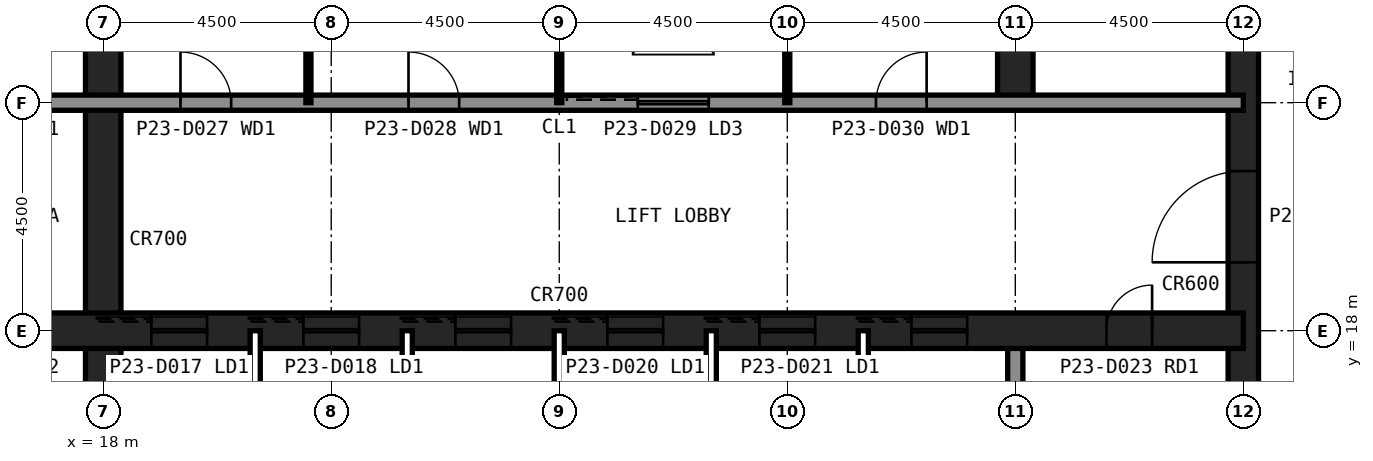
"""IFC4 building model, lengths in metres.
Left out: names, types, materials, properties, quantities, classifications, styles, units other than length and angle.
Written with IfcOpenShell. Run it as: python <this file> out.ifc"""

import sys

from ifc_helpers import new_model, si_unit, direction, frame, frame_2d, origin, place, context, subcontext, project, spatial, rectangle, extrude, element, fill, save


model = new_model("IFC4")
c1 = context("Model", 3, precision=1e-05, world=origin(), true_north=direction((0.0, 1.0)))
c2 = subcontext(c1, "Body", "Model", "MODEL_VIEW")
j1 = project(units=[si_unit("LENGTHUNIT", "METRE"), si_unit("PLANEANGLEUNIT", "RADIAN")], contexts=[c1])
p1 = place(None, origin())
s1 = spatial("IfcSite", under=j1, at=p1, CompositionType="ELEMENT")
p2 = place(p1, origin())
s2 = spatial("IfcBuilding", under=s1, at=p2, CompositionType="ELEMENT")
p3 = place(p2, frame((0.0, 0.0, 96.2)))
s3 = spatial("IfcBuildingStorey", under=s2, at=p3, CompositionType="ELEMENT", Elevation=96.2)
p4 = place(p3, frame((40.5, 13.5, 0.0), z_axis=(0.0, 0.0, 1.0), x_axis=(0.0, 1.0, 0.0)))
e1 = element("IfcWall", 1, at=p4, inside=s3, PredefinedType="SHEAR", context=c2, shape_type="SweptSolid", body=[
    extrude(rectangle(XDim=27.0, YDim=0.6, at=frame_2d((13.5, 0.0))), origin(), (0.0, 0.0, 1.0), 4.2),
])
p5 = place(p4, frame((5.85, 0.0, 0.0)))
e2 = element("IfcOpeningElement", 2, at=p5, cuts=e1, PredefinedType="OPENING", context=c2, shape_type="SweptSolid", body=[
    extrude(rectangle(XDim=1.8, YDim=2.1, at=frame_2d((0.9, 1.05))), frame((0.0, 0.31, 0.0), z_axis=(0.0, -1.0, 0.0), x_axis=(1.0, 0.0, 0.0)), (0.0, 0.0, 1.0), 0.62),
])
p6 = place(p4, frame((19.65, 0.0, 0.0)))
e3 = element("IfcOpeningElement", 3, at=p6, cuts=e1, PredefinedType="OPENING", context=c2, shape_type="SweptSolid", body=[
    extrude(rectangle(XDim=1.2, YDim=2.1, at=frame_2d((0.6, 1.05))), frame((0.0, 0.31, 0.0), z_axis=(0.0, -1.0, 0.0), x_axis=(1.0, 0.0, 0.0)), (0.0, 0.0, 1.0), 0.62),
])
p7 = place(p3, frame((18.0, 13.5, 0.0), z_axis=(0.0, 0.0, 1.0), x_axis=(0.0, 1.0, 0.0)))
e4 = element("IfcWall", 4, at=p7, inside=s3, PredefinedType="SHEAR", context=c2, shape_type="SweptSolid", body=[
    extrude(rectangle(XDim=18.0, YDim=0.7, at=frame_2d((9.0, 0.0))), origin(), (0.0, 0.0, 1.0), 4.2),
])
p8 = place(p3, frame((36.0, 13.5, 0.0), z_axis=(0.0, 0.0, 1.0), x_axis=(0.0, 1.0, 0.0)))
e5 = element("IfcWall", 5, at=p8, inside=s3, PredefinedType="SOLIDWALL", context=c2, shape_type="SweptSolid", body=[
    extrude(rectangle(XDim=4.5, YDim=0.3, at=frame_2d((2.25, 0.0))), origin(), (0.0, 0.0, 1.0), 4.04),
])
p9 = place(p3, frame((36.0, 22.5, 0.0), z_axis=(0.0, 0.0, 1.0), x_axis=(0.0, 1.0, 0.0)))
e6 = element("IfcWall", 6, at=p9, inside=s3, PredefinedType="SHEAR", context=c2, shape_type="SweptSolid", body=[
    extrude(rectangle(XDim=18.0, YDim=0.7, at=frame_2d((9.0, 0.0))), origin(), (0.0, 0.0, 1.0), 4.2),
])
p10 = place(p3, frame((13.5, 18.0, 0.0), z_axis=(0.0, 0.0, 1.0), x_axis=(1.0, 0.0, 0.0)))
e7 = element("IfcWall", 7, at=p10, inside=s3, PredefinedType="SHEAR", context=c2, shape_type="SweptSolid", body=[
    extrude(rectangle(XDim=27.0, YDim=0.7, at=frame_2d((13.5, 0.0))), origin(), (0.0, 0.0, 1.0), 4.2),
])
p11 = place(p10, frame((24.3, 0.0, 0.0)))
e8 = element("IfcOpeningElement", 8, at=p11, cuts=e7, PredefinedType="OPENING", context=c2, shape_type="SweptSolid", body=[
    extrude(rectangle(XDim=0.9, YDim=2.1, at=frame_2d((0.45, 1.05))), frame((0.0, 0.36, 0.0), z_axis=(0.0, -1.0, 0.0), x_axis=(1.0, 0.0, 0.0)), (0.0, 0.0, 1.0), 0.72),
])
p12 = place(p10, frame((5.45, 0.0, 0.0)))
e9 = element("IfcOpeningElement", 9, at=p12, cuts=e7, PredefinedType="OPENING", context=c2, shape_type="SweptSolid", body=[
    extrude(rectangle(XDim=1.1, YDim=2.1, at=frame_2d((0.55, 1.05))), frame((0.0, 0.36, 0.0), z_axis=(0.0, -1.0, 0.0), x_axis=(1.0, 0.0, 0.0)), (0.0, 0.0, 1.0), 0.72),
])
p13 = place(p10, frame((8.45, 0.0, 0.0)))
e10 = element("IfcOpeningElement", 10, at=p13, cuts=e7, PredefinedType="OPENING", context=c2, shape_type="SweptSolid", body=[
    extrude(rectangle(XDim=1.1, YDim=2.1, at=frame_2d((0.55, 1.05))), frame((0.0, 0.36, 0.0), z_axis=(0.0, -1.0, 0.0), x_axis=(1.0, 0.0, 0.0)), (0.0, 0.0, 1.0), 0.72),
])
p14 = place(p10, frame((11.45, 0.0, 0.0)))
e11 = element("IfcOpeningElement", 11, at=p14, cuts=e7, PredefinedType="OPENING", context=c2, shape_type="SweptSolid", body=[
    extrude(rectangle(XDim=1.1, YDim=2.1, at=frame_2d((0.55, 1.05))), frame((0.0, 0.36, 0.0), z_axis=(0.0, -1.0, 0.0), x_axis=(1.0, 0.0, 0.0)), (0.0, 0.0, 1.0), 0.72),
])
p15 = place(p10, frame((14.45, 0.0, 0.0)))
e12 = element("IfcOpeningElement", 12, at=p15, cuts=e7, PredefinedType="OPENING", context=c2, shape_type="SweptSolid", body=[
    extrude(rectangle(XDim=1.1, YDim=2.1, at=frame_2d((0.55, 1.05))), frame((0.0, 0.36, 0.0), z_axis=(0.0, -1.0, 0.0), x_axis=(1.0, 0.0, 0.0)), (0.0, 0.0, 1.0), 0.72),
])
p16 = place(p10, frame((17.45, 0.0, 0.0)))
e13 = element("IfcOpeningElement", 13, at=p16, cuts=e7, PredefinedType="OPENING", context=c2, shape_type="SweptSolid", body=[
    extrude(rectangle(XDim=1.1, YDim=2.1, at=frame_2d((0.55, 1.05))), frame((0.0, 0.36, 0.0), z_axis=(0.0, -1.0, 0.0), x_axis=(1.0, 0.0, 0.0)), (0.0, 0.0, 1.0), 0.72),
])
p17 = place(p10, frame((20.45, 0.0, 0.0)))
e14 = element("IfcOpeningElement", 14, at=p17, cuts=e7, PredefinedType="OPENING", context=c2, shape_type="SweptSolid", body=[
    extrude(rectangle(XDim=1.1, YDim=2.1, at=frame_2d((0.55, 1.05))), frame((0.0, 0.36, 0.0), z_axis=(0.0, -1.0, 0.0), x_axis=(1.0, 0.0, 0.0)), (0.0, 0.0, 1.0), 0.72),
])
p18 = place(p10, frame((1.6, 0.0, 0.0)))
e15 = element("IfcOpeningElement", 15, at=p18, cuts=e7, PredefinedType="OPENING", context=c2, shape_type="SweptSolid", body=[
    extrude(rectangle(XDim=1.3, YDim=2.2, at=frame_2d((0.65, 1.1))), frame((0.0, 0.36, 0.0), z_axis=(0.0, -1.0, 0.0), x_axis=(1.0, 0.0, 0.0)), (0.0, 0.0, 1.0), 0.72),
])
p19 = place(p3, frame((13.5, 22.5, 0.0), z_axis=(0.0, 0.0, 1.0), x_axis=(1.0, 0.0, 0.0)))
e16 = element("IfcWall", 16, at=p19, inside=s3, PredefinedType="SOLIDWALL", context=c2, shape_type="SweptSolid", body=[
    extrude(rectangle(XDim=27.0, YDim=0.3, at=frame_2d((13.5, 0.0))), origin(), (0.0, 0.0, 1.0), 4.04),
])
p20 = place(p19, frame((1.65, 0.0, 0.0)))
e17 = element("IfcOpeningElement", 17, at=p20, cuts=e16, PredefinedType="OPENING", context=c2, shape_type="SweptSolid", body=[
    extrude(rectangle(XDim=1.2, YDim=2.1, at=frame_2d((0.6, 1.05))), frame((0.0, 0.16, 0.0), z_axis=(0.0, -1.0, 0.0), x_axis=(1.0, 0.0, 0.0)), (0.0, 0.0, 1.0), 0.32),
])
p21 = place(p19, frame((6.025, 0.0, 0.0)))
e18 = element("IfcOpeningElement", 18, at=p21, cuts=e16, PredefinedType="OPENING", context=c2, shape_type="SweptSolid", body=[
    extrude(rectangle(XDim=1.0, YDim=2.1, at=frame_2d((0.5, 1.05))), frame((0.0, 0.16, 0.0), z_axis=(0.0, -1.0, 0.0), x_axis=(1.0, 0.0, 0.0)), (0.0, 0.0, 1.0), 0.32),
])
p22 = place(p19, frame((10.525, 0.0, 0.0)))
e19 = element("IfcOpeningElement", 19, at=p22, cuts=e16, PredefinedType="OPENING", context=c2, shape_type="SweptSolid", body=[
    extrude(rectangle(XDim=1.0, YDim=2.1, at=frame_2d((0.5, 1.05))), frame((0.0, 0.16, 0.0), z_axis=(0.0, -1.0, 0.0), x_axis=(1.0, 0.0, 0.0)), (0.0, 0.0, 1.0), 0.32),
])
p23 = place(p19, frame((19.75, 0.0, 0.0)))
e20 = element("IfcOpeningElement", 20, at=p23, cuts=e16, PredefinedType="OPENING", context=c2, shape_type="SweptSolid", body=[
    extrude(rectangle(XDim=1.0, YDim=2.1, at=frame_2d((0.5, 1.05))), frame((0.0, 0.16, 0.0), z_axis=(0.0, -1.0, 0.0), x_axis=(1.0, 0.0, 0.0)), (0.0, 0.0, 1.0), 0.32),
])
p24 = place(p19, frame((15.05, 0.0, 0.0)))
e21 = element("IfcOpeningElement", 21, at=p24, cuts=e16, PredefinedType="OPENING", context=c2, shape_type="SweptSolid", body=[
    extrude(rectangle(XDim=1.4, YDim=2.4, at=frame_2d((0.7, 1.2))), frame((0.0, 0.16, 0.0), z_axis=(0.0, -1.0, 0.0), x_axis=(1.0, 0.0, 0.0)), (0.0, 0.0, 1.0), 0.32),
])
for number, where, z_axis, x_axis in (
    (22, (21.0, 13.5, 0.0), (0.0, 0.0, 1.0), (0.0, 1.0, 0.0)),
    (23, (24.0, 13.5, 0.0), (0.0, 0.0, 1.0), (0.0, 1.0, 0.0)),
    (24, (27.0, 13.5, 0.0), (0.0, 0.0, 1.0), (0.0, 1.0, 0.0)),
    (25, (30.0, 13.5, 0.0), (0.0, 0.0, 1.0), (0.0, 1.0, 0.0)),
    (26, (33.0, 13.5, 0.0), (0.0, 0.0, 1.0), (0.0, 1.0, 0.0)),
):
    element("IfcWall", number, at=place(p3, frame(where, z_axis=z_axis, x_axis=x_axis)), inside=s3, PredefinedType="PARTITIONING", context=c2, shape_type="SweptSolid", body=[
        extrude(rectangle(XDim=4.5, YDim=0.2, at=frame_2d((2.25, 0.0))), origin(), (0.0, 0.0, 1.0), 4.04),
    ])
for number, where, z_axis, x_axis in (
    (27, (22.05, 22.5, 0.0), (0.0, 0.0, 1.0), (0.0, 1.0, 0.0)),
    (28, (27.0, 22.5, 0.0), (0.0, 0.0, 1.0), (0.0, 1.0, 0.0)),
    (29, (31.5, 22.5, 0.0), (0.0, 0.0, 1.0), (0.0, 1.0, 0.0)),
):
    element("IfcWall", number, at=place(p3, frame(where, z_axis=z_axis, x_axis=x_axis)), inside=s3, PredefinedType="PLUMBINGWALL", context=c2, shape_type="SweptSolid", body=[
        extrude(rectangle(XDim=9.0, YDim=0.1, at=frame_2d((4.5, 0.0))), origin(), (0.0, 0.0, 1.0), 4.04),
    ])
p25 = place(p5, origin())
e30 = element("IfcDoor", 30, at=p25, inside=s3, OperationType="SINGLE_SWING_LEFT", PredefinedType="DOOR", context=c2, shape_type="SweptSolid", body=[
    extrude(rectangle(XDim=1.8, YDim=2.1, at=frame_2d((0.9, 1.05))), frame((0.0, 0.025, 0.0), z_axis=(0.0, -1.0, 0.0), x_axis=(1.0, 0.0, 0.0)), (0.0, 0.0, 1.0), 0.05),
])
fill(e2, e30)
p26 = place(p21, origin())
e31 = element("IfcDoor", 31, at=p26, inside=s3, OperationType="SINGLE_SWING_LEFT", PredefinedType="DOOR", context=c2, shape_type="SweptSolid", body=[
    extrude(rectangle(XDim=1.0, YDim=2.1, at=frame_2d((0.5, 1.05))), frame((0.0, 0.025, 0.0), z_axis=(0.0, -1.0, 0.0), x_axis=(1.0, 0.0, 0.0)), (0.0, 0.0, 1.0), 0.05),
])
fill(e18, e31)
p27 = place(p22, origin())
e32 = element("IfcDoor", 32, at=p27, inside=s3, OperationType="SINGLE_SWING_LEFT", PredefinedType="DOOR", context=c2, shape_type="SweptSolid", body=[
    extrude(rectangle(XDim=1.0, YDim=2.1, at=frame_2d((0.5, 1.05))), frame((0.0, 0.025, 0.0), z_axis=(0.0, -1.0, 0.0), x_axis=(1.0, 0.0, 0.0)), (0.0, 0.0, 1.0), 0.05),
])
fill(e19, e32)
p28 = place(p23, origin())
e33 = element("IfcDoor", 33, at=p28, inside=s3, OperationType="SINGLE_SWING_RIGHT", PredefinedType="DOOR", context=c2, shape_type="SweptSolid", body=[
    extrude(rectangle(XDim=1.0, YDim=2.1, at=frame_2d((0.5, 1.05))), frame((0.0, 0.025, 0.0), z_axis=(0.0, -1.0, 0.0), x_axis=(1.0, 0.0, 0.0)), (0.0, 0.0, 1.0), 0.05),
])
fill(e20, e33)
p29 = place(p11, origin())
e34 = element("IfcDoor", 34, at=p29, inside=s3, OperationType="SINGLE_SWING_RIGHT", PredefinedType="DOOR", context=c2, shape_type="SweptSolid", body=[
    extrude(rectangle(XDim=0.9, YDim=2.1, at=frame_2d((0.45, 1.05))), frame((0.0, 0.025, 0.0), z_axis=(0.0, -1.0, 0.0), x_axis=(1.0, 0.0, 0.0)), (0.0, 0.0, 1.0), 0.05),
])
fill(e8, e34)
p30 = place(p12, origin())
e35 = element("IfcDoor", 35, at=p30, inside=s3, OperationType="SLIDING_TO_LEFT", PredefinedType="DOOR", context=c2, shape_type="SweptSolid", body=[
    extrude(rectangle(XDim=1.1, YDim=2.1, at=frame_2d((0.55, 1.05))), frame((0.0, 0.025, 0.0), z_axis=(0.0, -1.0, 0.0), x_axis=(1.0, 0.0, 0.0)), (0.0, 0.0, 1.0), 0.05),
])
fill(e9, e35)
p31 = place(p13, origin())
e36 = element("IfcDoor", 36, at=p31, inside=s3, OperationType="SLIDING_TO_LEFT", PredefinedType="DOOR", context=c2, shape_type="SweptSolid", body=[
    extrude(rectangle(XDim=1.1, YDim=2.1, at=frame_2d((0.55, 1.05))), frame((0.0, 0.025, 0.0), z_axis=(0.0, -1.0, 0.0), x_axis=(1.0, 0.0, 0.0)), (0.0, 0.0, 1.0), 0.05),
])
fill(e10, e36)
p32 = place(p14, origin())
e37 = element("IfcDoor", 37, at=p32, inside=s3, OperationType="SLIDING_TO_LEFT", PredefinedType="DOOR", context=c2, shape_type="SweptSolid", body=[
    extrude(rectangle(XDim=1.1, YDim=2.1, at=frame_2d((0.55, 1.05))), frame((0.0, 0.025, 0.0), z_axis=(0.0, -1.0, 0.0), x_axis=(1.0, 0.0, 0.0)), (0.0, 0.0, 1.0), 0.05),
])
fill(e11, e37)
p33 = place(p15, origin())
e38 = element("IfcDoor", 38, at=p33, inside=s3, OperationType="SLIDING_TO_LEFT", PredefinedType="DOOR", context=c2, shape_type="SweptSolid", body=[
    extrude(rectangle(XDim=1.1, YDim=2.1, at=frame_2d((0.55, 1.05))), frame((0.0, 0.025, 0.0), z_axis=(0.0, -1.0, 0.0), x_axis=(1.0, 0.0, 0.0)), (0.0, 0.0, 1.0), 0.05),
])
fill(e12, e38)
p34 = place(p16, origin())
e39 = element("IfcDoor", 39, at=p34, inside=s3, OperationType="SLIDING_TO_LEFT", PredefinedType="DOOR", context=c2, shape_type="SweptSolid", body=[
    extrude(rectangle(XDim=1.1, YDim=2.1, at=frame_2d((0.55, 1.05))), frame((0.0, 0.025, 0.0), z_axis=(0.0, -1.0, 0.0), x_axis=(1.0, 0.0, 0.0)), (0.0, 0.0, 1.0), 0.05),
])
fill(e13, e39)
p35 = place(p17, origin())
e40 = element("IfcDoor", 40, at=p35, inside=s3, OperationType="SLIDING_TO_LEFT", PredefinedType="DOOR", context=c2, shape_type="SweptSolid", body=[
    extrude(rectangle(XDim=1.1, YDim=2.1, at=frame_2d((0.55, 1.05))), frame((0.0, 0.025, 0.0), z_axis=(0.0, -1.0, 0.0), x_axis=(1.0, 0.0, 0.0)), (0.0, 0.0, 1.0), 0.05),
])
fill(e14, e40)
p36 = place(p24, origin())
e41 = element("IfcDoor", 41, at=p36, inside=s3, OperationType="SLIDING_TO_LEFT", PredefinedType="DOOR", context=c2, shape_type="SweptSolid", body=[
    extrude(rectangle(XDim=1.4, YDim=2.4, at=frame_2d((0.7, 1.2))), frame((0.0, 0.025, 0.0), z_axis=(0.0, -1.0, 0.0), x_axis=(1.0, 0.0, 0.0)), (0.0, 0.0, 1.0), 0.05),
])
fill(e21, e41)
save(model, sys.argv[1])
